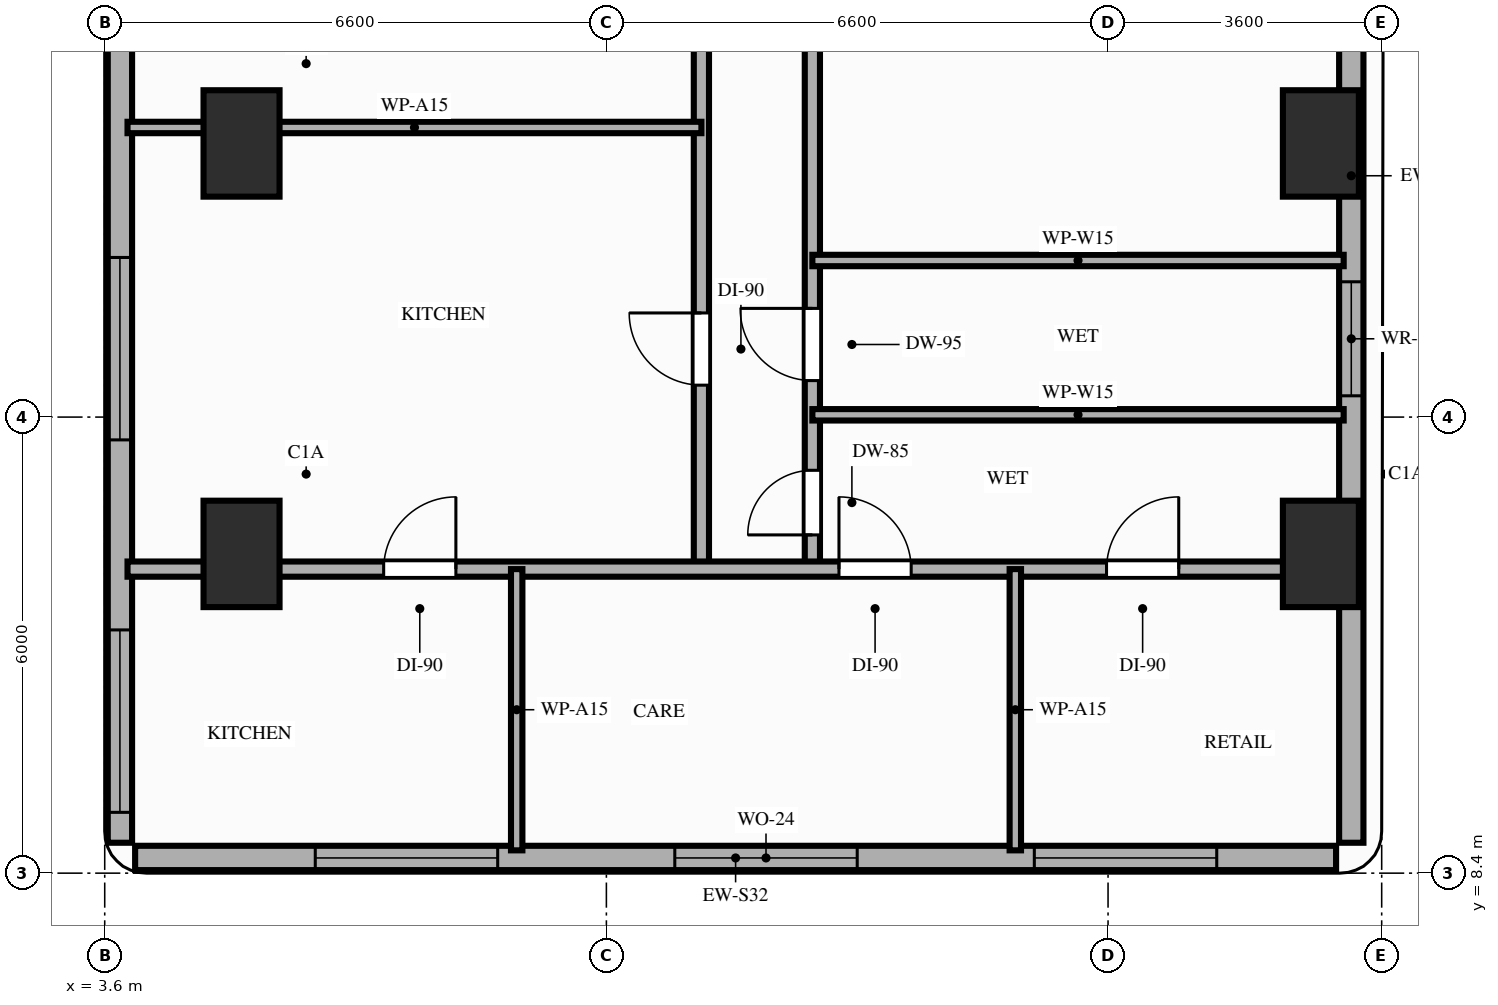
"""IFC4 building model, lengths in metres.
Left out: names, types, materials, properties, quantities, classifications, styles, units other than length and angle.
Written with IfcOpenShell. Run it as: python <this file> out.ifc"""

import sys

from ifc_helpers import new_model, si_unit, direction, frame, frame_2d, origin, origin_2d, place, context, subcontext, project, spatial, rectangle, extrude, element, fill, save


model = new_model("IFC4")
c1 = context("Model", 3, precision=1e-05, world=origin(), true_north=direction((0.0, 1.0)))
c2 = subcontext(c1, "Body", "Model", "MODEL_VIEW")
j1 = project(units=[si_unit("LENGTHUNIT", "METRE"), si_unit("PLANEANGLEUNIT", "RADIAN")], contexts=[c1])
p1 = place(None, origin())
s1 = spatial("IfcSite", under=j1, at=p1, CompositionType="ELEMENT")
p2 = place(p1, origin())
s2 = spatial("IfcBuilding", under=s1, at=p2, CompositionType="ELEMENT")
p3 = place(p2, frame((0.0, 0.0, 39.8)))
s3 = spatial("IfcBuildingStorey", under=s2, at=p3, CompositionType="ELEMENT", Elevation=39.8)
for number, where, z_axis, x_axis in (
    (1, (5.4, 12.6, 0.0), (0.0, 0.0, 1.0), (1.0, 0.0, 0.0)),
    (2, (19.6, 12.6, 0.0), (0.0, 0.0, 1.0), (1.0, 0.0, 0.0)),
    (3, (5.4, 18.0, 0.0), (0.0, 0.0, 1.0), (1.0, 0.0, 0.0)),
    (4, (19.6, 18.0, 0.0), (0.0, 0.0, 1.0), (1.0, 0.0, 0.0)),
):
    element("IfcColumn", number, at=place(p3, frame(where, z_axis=z_axis, x_axis=x_axis)), inside=s3, PredefinedType="COLUMN", context=c2, shape_type="SweptSolid", body=[
        extrude(rectangle(XDim=1.0, YDim=1.4, at=origin_2d()), origin(), (0.0, 0.0, 1.0), 3.8),
    ])
p4 = place(p3, frame((4.0, 8.6, 0.0), z_axis=(0.0, 0.0, 1.0), x_axis=(1.0, 0.0, 0.0)))
e5 = element("IfcWall", 5, at=p4, inside=s3, PredefinedType="STANDARD", context=c2, shape_type="SweptSolid", body=[
    extrude(rectangle(XDim=15.8, YDim=0.32, at=frame_2d((7.9, 0.0))), origin(), (0.0, 0.0, 1.0), 3.62),
])
p5 = place(p4, frame((7.1, 0.0, 0.85)))
e6 = element("IfcOpeningElement", 6, at=p5, cuts=e5, PredefinedType="OPENING", context=c2, shape_type="SweptSolid", body=[
    extrude(rectangle(XDim=2.4, YDim=1.8, at=frame_2d((1.2, 0.9))), frame((0.0, 0.17, 0.0), z_axis=(0.0, -1.0, 0.0), x_axis=(1.0, 0.0, 0.0)), (0.0, 0.0, 1.0), 0.34),
])
p6 = place(p4, frame((2.37, 0.0, 0.85)))
e7 = element("IfcOpeningElement", 7, at=p6, cuts=e5, PredefinedType="OPENING", context=c2, shape_type="SweptSolid", body=[
    extrude(rectangle(XDim=2.4, YDim=1.8, at=frame_2d((1.2, 0.9))), frame((0.0, 0.17, 0.0), z_axis=(0.0, -1.0, 0.0), x_axis=(1.0, 0.0, 0.0)), (0.0, 0.0, 1.0), 0.34),
])
p7 = place(p4, frame((11.83, 0.0, 0.85)))
e8 = element("IfcOpeningElement", 8, at=p7, cuts=e5, PredefinedType="OPENING", context=c2, shape_type="SweptSolid", body=[
    extrude(rectangle(XDim=2.4, YDim=1.8, at=frame_2d((1.2, 0.9))), frame((0.0, 0.17, 0.0), z_axis=(0.0, -1.0, 0.0), x_axis=(1.0, 0.0, 0.0)), (0.0, 0.0, 1.0), 0.34),
])
p8 = place(p3, frame((3.8, 42.1, 0.0), z_axis=(0.0, 0.0, 1.0), x_axis=(0.0, -1.0, 0.0)))
e9 = element("IfcWall", 9, at=p8, inside=s3, PredefinedType="STANDARD", context=c2, shape_type="SweptSolid", body=[
    extrude(rectangle(XDim=33.3, YDim=0.32, at=frame_2d((16.65, 0.0))), origin(), (0.0, 0.0, 1.0), 3.3),
])
p9 = place(p8, frame((20.7, 0.0, 0.0)))
e10 = element("IfcOpeningElement", 10, at=p9, cuts=e9, PredefinedType="OPENING", context=c2, shape_type="SweptSolid", body=[
    extrude(rectangle(XDim=1.4, YDim=2.1, at=frame_2d((0.7, 1.05))), frame((0.0, 0.17, 0.0), z_axis=(0.0, -1.0, 0.0), x_axis=(1.0, 0.0, 0.0)), (0.0, 0.0, 1.0), 0.34),
])
p10 = place(p8, frame((30.5, 0.0, 0.85)))
e11 = element("IfcOpeningElement", 11, at=p10, cuts=e9, PredefinedType="OPENING", context=c2, shape_type="SweptSolid", body=[
    extrude(rectangle(XDim=2.4, YDim=1.8, at=frame_2d((1.2, 0.9))), frame((0.0, 0.17, 0.0), z_axis=(0.0, -1.0, 0.0), x_axis=(1.0, 0.0, 0.0)), (0.0, 0.0, 1.0), 0.34),
])
p11 = place(p8, frame((25.6, 0.0, 0.85)))
e12 = element("IfcOpeningElement", 12, at=p11, cuts=e9, PredefinedType="OPENING", context=c2, shape_type="SweptSolid", body=[
    extrude(rectangle(XDim=2.4, YDim=1.8, at=frame_2d((1.2, 0.9))), frame((0.0, 0.17, 0.0), z_axis=(0.0, -1.0, 0.0), x_axis=(1.0, 0.0, 0.0)), (0.0, 0.0, 1.0), 0.34),
])
p12 = place(p8, frame((14.8, 0.0, 0.85)))
e13 = element("IfcOpeningElement", 13, at=p12, cuts=e9, PredefinedType="OPENING", context=c2, shape_type="SweptSolid", body=[
    extrude(rectangle(XDim=2.4, YDim=1.8, at=frame_2d((1.2, 0.9))), frame((0.0, 0.17, 0.0), z_axis=(0.0, -1.0, 0.0), x_axis=(1.0, 0.0, 0.0)), (0.0, 0.0, 1.0), 0.34),
])
p13 = place(p8, frame((9.6, 0.0, 0.85)))
e14 = element("IfcOpeningElement", 14, at=p13, cuts=e9, PredefinedType="OPENING", context=c2, shape_type="SweptSolid", body=[
    extrude(rectangle(XDim=2.4, YDim=1.8, at=frame_2d((1.2, 0.9))), frame((0.0, 0.17, 0.0), z_axis=(0.0, -1.0, 0.0), x_axis=(1.0, 0.0, 0.0)), (0.0, 0.0, 1.0), 0.34),
])
p14 = place(p8, frame((3.5, 0.0, 0.85)))
e15 = element("IfcOpeningElement", 15, at=p14, cuts=e9, PredefinedType="OPENING", context=c2, shape_type="SweptSolid", body=[
    extrude(rectangle(XDim=2.4, YDim=1.8, at=frame_2d((1.2, 0.9))), frame((0.0, 0.17, 0.0), z_axis=(0.0, -1.0, 0.0), x_axis=(1.0, 0.0, 0.0)), (0.0, 0.0, 1.0), 0.34),
])
p15 = place(p3, frame((20.0, 8.8, 0.0), z_axis=(0.0, 0.0, 1.0), x_axis=(0.0, 1.0, 0.0)))
e16 = element("IfcWall", 16, at=p15, inside=s3, PredefinedType="STANDARD", context=c2, shape_type="SweptSolid", body=[
    extrude(rectangle(XDim=17.55, YDim=0.32, at=frame_2d((8.775, 0.0))), origin(), (0.0, 0.0, 1.0), 3.0),
])
p16 = place(p15, frame((5.88, 0.0, 0.85)))
e17 = element("IfcOpeningElement", 17, at=p16, cuts=e16, PredefinedType="OPENING", context=c2, shape_type="SweptSolid", body=[
    extrude(rectangle(XDim=1.5, YDim=1.75, at=frame_2d((0.75, 0.875))), frame((0.0, 0.17, 0.0), z_axis=(0.0, -1.0, 0.0), x_axis=(1.0, 0.0, 0.0)), (0.0, 0.0, 1.0), 0.34),
])
p17 = place(p15, frame((10.7, 0.0, 0.85)))
e18 = element("IfcOpeningElement", 18, at=p17, cuts=e16, PredefinedType="OPENING", context=c2, shape_type="SweptSolid", body=[
    extrude(rectangle(XDim=2.4, YDim=1.8, at=frame_2d((1.2, 0.9))), frame((0.0, 0.17, 0.0), z_axis=(0.0, -1.0, 0.0), x_axis=(1.0, 0.0, 0.0)), (0.0, 0.0, 1.0), 0.34),
])
p18 = place(p3, frame((11.45, 12.4, 0.0), z_axis=(0.0, 0.0, 1.0), x_axis=(0.0, 1.0, 0.0)))
e19 = element("IfcWall", 19, at=p18, inside=s3, PredefinedType="PARTITIONING", context=c2, shape_type="SweptSolid", body=[
    extrude(rectangle(XDim=15.7, YDim=0.2, at=frame_2d((7.85, 0.0))), origin(), (0.0, 0.0, 1.0), 3.0),
])
p19 = place(p18, frame((2.42, 0.0, 0.0)))
e20 = element("IfcOpeningElement", 20, at=p19, cuts=e19, PredefinedType="OPENING", context=c2, shape_type="SweptSolid", body=[
    extrude(rectangle(XDim=0.95, YDim=2.15, at=frame_2d((0.475, 1.075))), frame((0.0, 0.11, 0.0), z_axis=(0.0, -1.0, 0.0), x_axis=(1.0, 0.0, 0.0)), (0.0, 0.0, 1.0), 0.22),
])
p20 = place(p18, frame((10.28, 0.0, 0.0)))
e21 = element("IfcOpeningElement", 21, at=p20, cuts=e19, PredefinedType="OPENING", context=c2, shape_type="SweptSolid", body=[
    extrude(rectangle(XDim=0.95, YDim=2.15, at=frame_2d((0.475, 1.075))), frame((0.0, 0.11, 0.0), z_axis=(0.0, -1.0, 0.0), x_axis=(1.0, 0.0, 0.0)), (0.0, 0.0, 1.0), 0.22),
])
p21 = place(p3, frame((12.91, 12.4, 0.0), z_axis=(0.0, 0.0, 1.0), x_axis=(0.0, 1.0, 0.0)))
e22 = element("IfcWall", 22, at=p21, inside=s3, PredefinedType="PARTITIONING", context=c2, shape_type="SweptSolid", body=[
    extrude(rectangle(XDim=15.7, YDim=0.2, at=frame_2d((7.85, 0.0))), origin(), (0.0, 0.0, 1.0), 3.0),
])
p22 = place(p21, frame((0.45, 0.0, 0.0)))
e23 = element("IfcOpeningElement", 23, at=p22, cuts=e22, PredefinedType="OPENING", context=c2, shape_type="SweptSolid", body=[
    extrude(rectangle(XDim=0.85, YDim=2.1, at=frame_2d((0.425, 1.05))), frame((0.0, 0.11, 0.0), z_axis=(0.0, -1.0, 0.0), x_axis=(1.0, 0.0, 0.0)), (0.0, 0.0, 1.0), 0.22),
])
p23 = place(p21, frame((2.48, 0.0, 0.0)))
e24 = element("IfcOpeningElement", 24, at=p23, cuts=e22, PredefinedType="OPENING", context=c2, shape_type="SweptSolid", body=[
    extrude(rectangle(XDim=0.95, YDim=2.1, at=frame_2d((0.475, 1.05))), frame((0.0, 0.11, 0.0), z_axis=(0.0, -1.0, 0.0), x_axis=(1.0, 0.0, 0.0)), (0.0, 0.0, 1.0), 0.22),
])
p24 = place(p21, frame((9.38, 0.0, 0.0)))
e25 = element("IfcOpeningElement", 25, at=p24, cuts=e22, PredefinedType="OPENING", context=c2, shape_type="SweptSolid", body=[
    extrude(rectangle(XDim=1.0, YDim=2.15, at=frame_2d((0.5, 1.075))), frame((0.0, 0.11, 0.0), z_axis=(0.0, -1.0, 0.0), x_axis=(1.0, 0.0, 0.0)), (0.0, 0.0, 1.0), 0.22),
])
p25 = place(p3, frame((3.9, 12.4, 0.0), z_axis=(0.0, 0.0, 1.0), x_axis=(1.0, 0.0, 0.0)))
e26 = element("IfcWall", 26, at=p25, inside=s3, PredefinedType="PARTITIONING", context=c2, shape_type="SweptSolid", body=[
    extrude(rectangle(XDim=16.0, YDim=0.2, at=frame_2d((8.0, 0.0))), origin(), (0.0, 0.0, 1.0), 3.0),
])
p26 = place(p25, frame((3.37, 0.0, 0.0)))
e27 = element("IfcOpeningElement", 27, at=p26, cuts=e26, PredefinedType="OPENING", context=c2, shape_type="SweptSolid", body=[
    extrude(rectangle(XDim=0.95, YDim=2.15, at=frame_2d((0.475, 1.075))), frame((0.0, 0.11, 0.0), z_axis=(0.0, -1.0, 0.0), x_axis=(1.0, 0.0, 0.0)), (0.0, 0.0, 1.0), 0.22),
])
p27 = place(p25, frame((9.36, 0.0, 0.0)))
e28 = element("IfcOpeningElement", 28, at=p27, cuts=e26, PredefinedType="OPENING", context=c2, shape_type="SweptSolid", body=[
    extrude(rectangle(XDim=0.95, YDim=2.15, at=frame_2d((0.475, 1.075))), frame((0.0, 0.11, 0.0), z_axis=(0.0, -1.0, 0.0), x_axis=(1.0, 0.0, 0.0)), (0.0, 0.0, 1.0), 0.22),
])
p28 = place(p25, frame((12.88, 0.0, 0.0)))
e29 = element("IfcOpeningElement", 29, at=p28, cuts=e26, PredefinedType="OPENING", context=c2, shape_type="SweptSolid", body=[
    extrude(rectangle(XDim=0.95, YDim=2.15, at=frame_2d((0.475, 1.075))), frame((0.0, 0.11, 0.0), z_axis=(0.0, -1.0, 0.0), x_axis=(1.0, 0.0, 0.0)), (0.0, 0.0, 1.0), 0.22),
])
p29 = place(p3, frame((3.9, 18.21, 0.0), z_axis=(0.0, 0.0, 1.0), x_axis=(1.0, 0.0, 0.0)))
e30 = element("IfcWall", 30, at=p29, inside=s3, PredefinedType="PARTITIONING", context=c2, shape_type="SweptSolid", body=[
    extrude(rectangle(XDim=7.55, YDim=0.15, at=frame_2d((3.775, 0.0))), origin(), (0.0, 0.0, 1.0), 3.0),
])
for number, where, z_axis, x_axis in (
    (31, (9.02, 8.7, 0.0), (0.0, 0.0, 1.0), (0.0, 1.0, 0.0)),
    (32, (15.58, 8.7, 0.0), (0.0, 0.0, 1.0), (0.0, 1.0, 0.0)),
):
    element("IfcWall", number, at=place(p3, frame(where, z_axis=z_axis, x_axis=x_axis)), inside=s3, PredefinedType="PARTITIONING", context=c2, shape_type="SweptSolid", body=[
        extrude(rectangle(XDim=3.7, YDim=0.15, at=frame_2d((1.85, 0.0))), origin(), (0.0, 0.0, 1.0), 3.0),
    ])
for number, where, z_axis, x_axis in (
    (33, (12.91, 14.43, 0.0), (0.0, 0.0, 1.0), (1.0, 0.0, 0.0)),
    (34, (12.91, 16.46, 0.0), (0.0, 0.0, 1.0), (1.0, 0.0, 0.0)),
):
    element("IfcWall", number, at=place(p3, frame(where, z_axis=z_axis, x_axis=x_axis)), inside=s3, PredefinedType="PARTITIONING", context=c2, shape_type="SweptSolid", body=[
        extrude(rectangle(XDim=6.99, YDim=0.15, at=frame_2d((3.495, 0.0))), origin(), (0.0, 0.0, 1.0), 3.0),
    ])
p30 = place(p5, origin())
e35 = element("IfcWindow", 35, at=p30, inside=s3, PartitioningType="SINGLE_PANEL", PredefinedType="WINDOW", context=c2, shape_type="SweptSolid", body=[
    extrude(rectangle(XDim=2.4, YDim=1.8, at=frame_2d((1.2, 0.9))), frame((0.0, 0.03, 0.0), z_axis=(0.0, -1.0, 0.0), x_axis=(1.0, 0.0, 0.0)), (0.0, 0.0, 1.0), 0.06),
])
fill(e6, e35)
p31 = place(p10, origin())
e36 = element("IfcWindow", 36, at=p31, inside=s3, PartitioningType="SINGLE_PANEL", PredefinedType="WINDOW", context=c2, shape_type="SweptSolid", body=[
    extrude(rectangle(XDim=2.4, YDim=1.8, at=frame_2d((1.2, 0.9))), frame((0.0, 0.03, 0.0), z_axis=(0.0, -1.0, 0.0), x_axis=(1.0, 0.0, 0.0)), (0.0, 0.0, 1.0), 0.06),
])
fill(e11, e36)
p32 = place(p11, origin())
e37 = element("IfcWindow", 37, at=p32, inside=s3, PartitioningType="SINGLE_PANEL", PredefinedType="WINDOW", context=c2, shape_type="SweptSolid", body=[
    extrude(rectangle(XDim=2.4, YDim=1.8, at=frame_2d((1.2, 0.9))), frame((0.0, 0.03, 0.0), z_axis=(0.0, -1.0, 0.0), x_axis=(1.0, 0.0, 0.0)), (0.0, 0.0, 1.0), 0.06),
])
fill(e12, e37)
p33 = place(p16, origin())
e38 = element("IfcWindow", 38, at=p33, inside=s3, PartitioningType="SINGLE_PANEL", PredefinedType="WINDOW", context=c2, shape_type="SweptSolid", body=[
    extrude(rectangle(XDim=1.5, YDim=1.75, at=frame_2d((0.75, 0.875))), frame((0.0, 0.03, 0.0), z_axis=(0.0, -1.0, 0.0), x_axis=(1.0, 0.0, 0.0)), (0.0, 0.0, 1.0), 0.06),
])
fill(e17, e38)
p34 = place(p6, origin())
e39 = element("IfcWindow", 39, at=p34, inside=s3, PartitioningType="SINGLE_PANEL", PredefinedType="WINDOW", context=c2, shape_type="SweptSolid", body=[
    extrude(rectangle(XDim=2.4, YDim=1.8, at=frame_2d((1.2, 0.9))), frame((0.0, 0.03, 0.0), z_axis=(0.0, -1.0, 0.0), x_axis=(1.0, 0.0, 0.0)), (0.0, 0.0, 1.0), 0.06),
])
fill(e7, e39)
p35 = place(p7, origin())
e40 = element("IfcWindow", 40, at=p35, inside=s3, PartitioningType="SINGLE_PANEL", PredefinedType="WINDOW", context=c2, shape_type="SweptSolid", body=[
    extrude(rectangle(XDim=2.4, YDim=1.8, at=frame_2d((1.2, 0.9))), frame((0.0, 0.03, 0.0), z_axis=(0.0, -1.0, 0.0), x_axis=(1.0, 0.0, 0.0)), (0.0, 0.0, 1.0), 0.06),
])
fill(e8, e40)
p36 = place(p19, origin())
e41 = element("IfcDoor", 41, at=p36, inside=s3, OperationType="SINGLE_SWING_RIGHT", PredefinedType="DOOR", context=c2, shape_type="SweptSolid", body=[
    extrude(rectangle(XDim=0.95, YDim=2.15, at=frame_2d((0.475, 1.075))), frame((0.0, 0.025, 0.0), z_axis=(0.0, -1.0, 0.0), x_axis=(1.0, 0.0, 0.0)), (0.0, 0.0, 1.0), 0.05),
])
fill(e20, e41)
p37 = place(p26, origin())
e42 = element("IfcDoor", 42, at=p37, inside=s3, OperationType="SINGLE_SWING_RIGHT", PredefinedType="DOOR", context=c2, shape_type="SweptSolid", body=[
    extrude(rectangle(XDim=0.95, YDim=2.15, at=frame_2d((0.475, 1.075))), frame((0.0, 0.025, 0.0), z_axis=(0.0, -1.0, 0.0), x_axis=(1.0, 0.0, 0.0)), (0.0, 0.0, 1.0), 0.05),
])
fill(e27, e42)
p38 = place(p27, origin())
e43 = element("IfcDoor", 43, at=p38, inside=s3, OperationType="SINGLE_SWING_LEFT", PredefinedType="DOOR", context=c2, shape_type="SweptSolid", body=[
    extrude(rectangle(XDim=0.95, YDim=2.15, at=frame_2d((0.475, 1.075))), frame((0.0, 0.025, 0.0), z_axis=(0.0, -1.0, 0.0), x_axis=(1.0, 0.0, 0.0)), (0.0, 0.0, 1.0), 0.05),
])
fill(e28, e43)
p39 = place(p28, origin())
e44 = element("IfcDoor", 44, at=p39, inside=s3, OperationType="SINGLE_SWING_RIGHT", PredefinedType="DOOR", context=c2, shape_type="SweptSolid", body=[
    extrude(rectangle(XDim=0.95, YDim=2.15, at=frame_2d((0.475, 1.075))), frame((0.0, 0.025, 0.0), z_axis=(0.0, -1.0, 0.0), x_axis=(1.0, 0.0, 0.0)), (0.0, 0.0, 1.0), 0.05),
])
fill(e29, e44)
p40 = place(p22, origin())
e45 = element("IfcDoor", 45, at=p40, inside=s3, OperationType="SINGLE_SWING_LEFT", PredefinedType="DOOR", context=c2, shape_type="SweptSolid", body=[
    extrude(rectangle(XDim=0.85, YDim=2.1, at=frame_2d((0.425, 1.05))), frame((0.0, 0.025, 0.0), z_axis=(0.0, -1.0, 0.0), x_axis=(1.0, 0.0, 0.0)), (0.0, 0.0, 1.0), 0.05),
])
fill(e23, e45)
p41 = place(p23, origin())
e46 = element("IfcDoor", 46, at=p41, inside=s3, OperationType="SINGLE_SWING_RIGHT", PredefinedType="DOOR", context=c2, shape_type="SweptSolid", body=[
    extrude(rectangle(XDim=0.95, YDim=2.1, at=frame_2d((0.475, 1.05))), frame((0.0, 0.025, 0.0), z_axis=(0.0, -1.0, 0.0), x_axis=(1.0, 0.0, 0.0)), (0.0, 0.0, 1.0), 0.05),
])
fill(e24, e46)
save(model, sys.argv[1])
